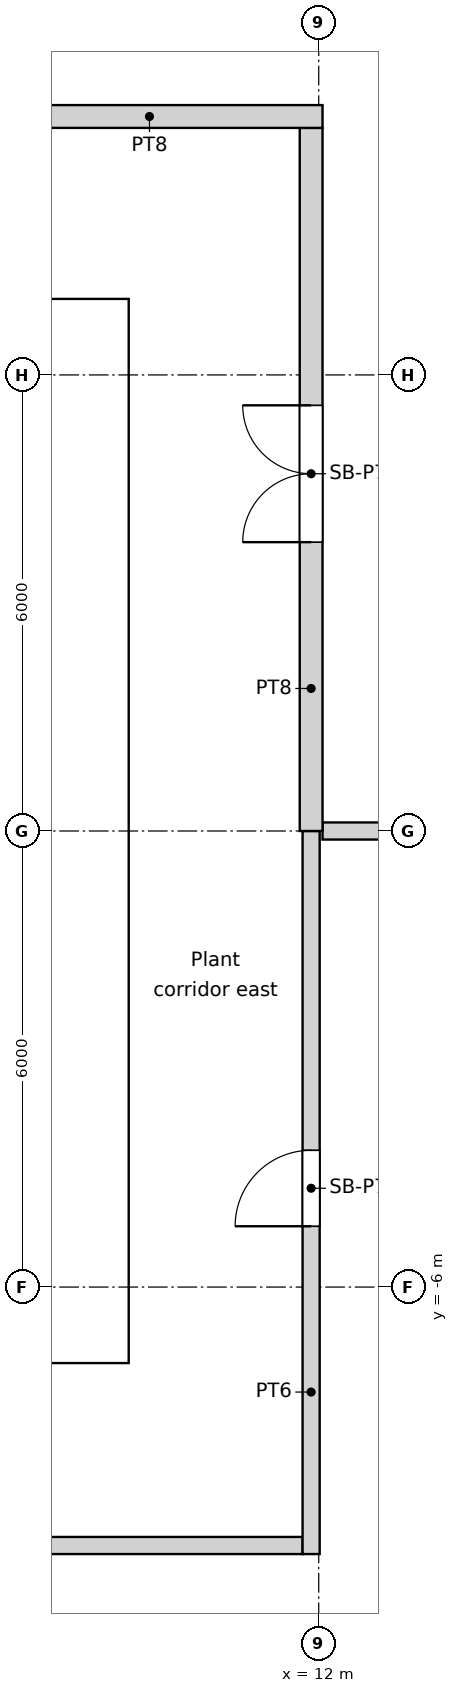
"""IFC4 building model, lengths in metres.
Left out: names, types, materials, properties, quantities, classifications, styles, units other than length and angle.
Written with IfcOpenShell. Run it as: python <this file> out.ifc"""

import sys

from ifc_helpers import new_model, si_unit, direction, frame, frame_2d, origin, place, context, subcontext, project, spatial, rectangle, extrude, element, fill, save


model = new_model("IFC4")
c1 = context("Model", 3, precision=1e-05, world=origin(), true_north=direction((0.0, 1.0)))
c2 = subcontext(c1, "Body", "Model", "MODEL_VIEW")
j1 = project(units=[si_unit("LENGTHUNIT", "METRE"), si_unit("PLANEANGLEUNIT", "RADIAN")], contexts=[c1])
p1 = place(None, origin())
s1 = spatial("IfcSite", under=j1, at=p1, CompositionType="ELEMENT")
p2 = place(p1, origin())
s2 = spatial("IfcBuilding", under=s1, at=p2, CompositionType="ELEMENT")
p3 = place(p2, frame((0.0, 0.0, 277.8)))
s3 = spatial("IfcBuildingStorey", under=s2, at=p3, CompositionType="ELEMENT", Elevation=277.8)
p4 = place(p3, frame((-9.5, -6.7, 0.0), z_axis=(0.0, 0.0, 1.0), x_axis=(1.0, 0.0, 0.0)))
e1 = element("IfcWall", 1, at=p4, inside=s3, PredefinedType="SOLIDWALL", context=c2, shape_type="SweptSolid", body=[
    extrude(rectangle(XDim=19.0, YDim=0.6, at=frame_2d((9.5, 0.0))), origin(), (0.0, 0.0, 1.0), 6.0),
])
p5 = place(p4, frame((10.4, 0.0, 0.0)))
e2 = element("IfcOpeningElement", 2, at=p5, cuts=e1, PredefinedType="OPENING", context=c2, shape_type="SweptSolid", body=[
    extrude(rectangle(XDim=1.0, YDim=2.1, at=frame_2d((0.5, 1.05))), frame((0.0, 0.3, 0.0), z_axis=(0.0, -1.0, 0.0), x_axis=(1.0, 0.0, 0.0)), (0.0, 0.0, 1.0), 0.6),
])
p6 = place(p4, frame((5.35, 0.0, 0.0)))
e3 = element("IfcOpeningElement", 3, at=p6, cuts=e1, PredefinedType="OPENING", context=c2, shape_type="SweptSolid", body=[
    extrude(rectangle(XDim=1.7, YDim=2.1, at=frame_2d((0.85, 1.05))), frame((0.0, 0.3, 0.0), z_axis=(0.0, -1.0, 0.0), x_axis=(1.0, 0.0, 0.0)), (0.0, 0.0, 1.0), 0.6),
])
p7 = place(p4, frame((11.95, 0.0, 0.0)))
e4 = element("IfcOpeningElement", 4, at=p7, cuts=e1, PredefinedType="OPENING", context=c2, shape_type="SweptSolid", body=[
    extrude(rectangle(XDim=1.7, YDim=2.1, at=frame_2d((0.85, 1.05))), frame((0.0, 0.3, 0.0), z_axis=(0.0, -1.0, 0.0), x_axis=(1.0, 0.0, 0.0)), (0.0, 0.0, 1.0), 0.6),
])
p8 = place(p3, frame((-9.5, 6.7, 0.0), z_axis=(0.0, 0.0, 1.0), x_axis=(1.0, 0.0, 0.0)))
e5 = element("IfcWall", 5, at=p8, inside=s3, PredefinedType="SOLIDWALL", context=c2, shape_type="SweptSolid", body=[
    extrude(rectangle(XDim=19.0, YDim=0.6, at=frame_2d((9.5, 0.0))), origin(), (0.0, 0.0, 1.0), 6.0),
])
p9 = place(p8, frame((5.35, 0.0, 0.0)))
e6 = element("IfcOpeningElement", 6, at=p9, cuts=e5, PredefinedType="OPENING", context=c2, shape_type="SweptSolid", body=[
    extrude(rectangle(XDim=1.7, YDim=2.1, at=frame_2d((0.85, 1.05))), frame((0.0, 0.3, 0.0), z_axis=(0.0, -1.0, 0.0), x_axis=(1.0, 0.0, 0.0)), (0.0, 0.0, 1.0), 0.6),
])
p10 = place(p3, frame((9.2, -6.4, 0.0), z_axis=(0.0, 0.0, 1.0), x_axis=(0.0, 1.0, 0.0)))
e7 = element("IfcWall", 7, at=p10, inside=s3, PredefinedType="SOLIDWALL", context=c2, shape_type="SweptSolid", body=[
    extrude(rectangle(XDim=12.8, YDim=0.6, at=frame_2d((6.4, 0.0))), origin(), (0.0, 0.0, 1.0), 6.0),
])
p11 = place(p10, frame((6.4, 0.0, 0.0)))
e8 = element("IfcOpeningElement", 8, at=p11, cuts=e7, PredefinedType="OPENING", context=c2, shape_type="SweptSolid", body=[
    extrude(rectangle(XDim=1.8, YDim=2.1, at=frame_2d((0.9, 1.05))), frame((0.0, 0.3, 0.0), z_axis=(0.0, -1.0, 0.0), x_axis=(1.0, 0.0, 0.0)), (0.0, 0.0, 1.0), 0.6),
])
p12 = place(p3, frame((2.1, -3.1, 0.0), z_axis=(0.0, 0.0, 1.0), x_axis=(1.0, 0.0, 0.0)))
e9 = element("IfcWall", 9, at=p12, inside=s3, PredefinedType="SOLIDWALL", context=c2, shape_type="SweptSolid", body=[
    extrude(rectangle(XDim=6.8, YDim=0.3, at=frame_2d((3.4, 0.0))), origin(), (0.0, 0.0, 1.0), 5.65),
])
p13 = place(p12, frame((0.35, 0.0, 0.0)))
e10 = element("IfcOpeningElement", 10, at=p13, cuts=e9, PredefinedType="OPENING", context=c2, shape_type="SweptSolid", body=[
    extrude(rectangle(XDim=1.7, YDim=2.1, at=frame_2d((0.85, 1.05))), frame((0.0, 0.15, 0.0), z_axis=(0.0, -1.0, 0.0), x_axis=(1.0, 0.0, 0.0)), (0.0, 0.0, 1.0), 0.3),
])
p14 = place(p3, frame((-4.35, 3.1, 0.0), z_axis=(0.0, 0.0, 1.0), x_axis=(1.0, 0.0, 0.0)))
e11 = element("IfcWall", 11, at=p14, inside=s3, PredefinedType="SOLIDWALL", context=c2, shape_type="SweptSolid", body=[
    extrude(rectangle(XDim=13.25, YDim=0.3, at=frame_2d((6.625, 0.0))), origin(), (0.0, 0.0, 1.0), 5.65),
])
p15 = place(p3, frame((4.225, -1.275, 0.0), z_axis=(0.0, 0.0, 1.0), x_axis=(1.0, 0.0, 0.0)))
e12 = element("IfcWall", 12, at=p15, inside=s3, PredefinedType="SOLIDWALL", context=c2, shape_type="SweptSolid", body=[
    extrude(rectangle(XDim=4.675, YDim=0.15, at=frame_2d((2.337, 0.0))), origin(), (0.0, 0.0, 1.0), 5.65),
])
p16 = place(p15, frame((0.55, 0.0, 0.0)))
e13 = element("IfcOpeningElement", 13, at=p16, cuts=e12, PredefinedType="OPENING", context=c2, shape_type="SweptSolid", body=[
    extrude(rectangle(XDim=0.9, YDim=2.1, at=frame_2d((0.45, 1.05))), frame((0.0, 0.075, 0.0), z_axis=(0.0, -1.0, 0.0), x_axis=(1.0, 0.0, 0.0)), (0.0, 0.0, 1.0), 0.15),
])
p17 = place(p15, frame((2.188, 0.0, 0.0)))
e14 = element("IfcOpeningElement", 14, at=p17, cuts=e12, PredefinedType="OPENING", context=c2, shape_type="SweptSolid", body=[
    extrude(rectangle(XDim=0.9, YDim=2.1, at=frame_2d((0.45, 1.05))), frame((0.0, 0.075, 0.0), z_axis=(0.0, -1.0, 0.0), x_axis=(1.0, 0.0, 0.0)), (0.0, 0.0, 1.0), 0.15),
])
p18 = place(p15, frame((3.6, 0.0, 0.0)))
e15 = element("IfcOpeningElement", 15, at=p18, cuts=e12, PredefinedType="OPENING", context=c2, shape_type="SweptSolid", body=[
    extrude(rectangle(XDim=0.9, YDim=2.1, at=frame_2d((0.45, 1.05))), frame((0.0, 0.075, 0.0), z_axis=(0.0, -1.0, 0.0), x_axis=(1.0, 0.0, 0.0)), (0.0, 0.0, 1.0), 0.15),
])
p19 = place(p3, frame((-11.788, -9.4, 0.0), z_axis=(0.0, 0.0, 1.0), x_axis=(1.0, 0.0, 0.0)))
e16 = element("IfcWall", 16, at=p19, inside=s3, PredefinedType="PARTITIONING", context=c2, shape_type="SweptSolid", body=[
    extrude(rectangle(XDim=23.575, YDim=0.225, at=frame_2d((11.788, 0.0))), origin(), (0.0, 0.0, 1.0), 5.65),
])
p20 = place(p19, frame((6.89, 0.0, 0.0)))
e17 = element("IfcOpeningElement", 17, at=p20, cuts=e16, PredefinedType="OPENING", context=c2, shape_type="SweptSolid", body=[
    extrude(rectangle(XDim=1.0, YDim=2.1, at=frame_2d((0.5, 1.05))), frame((0.0, 0.113, 0.0), z_axis=(0.0, -1.0, 0.0), x_axis=(1.0, 0.0, 0.0)), (0.0, 0.0, 1.0), 0.225),
])
p21 = place(p19, frame((15.388, 0.0, 0.0)))
e18 = element("IfcOpeningElement", 18, at=p21, cuts=e16, PredefinedType="OPENING", context=c2, shape_type="SweptSolid", body=[
    extrude(rectangle(XDim=1.0, YDim=2.1, at=frame_2d((0.5, 1.05))), frame((0.0, 0.113, 0.0), z_axis=(0.0, -1.0, 0.0), x_axis=(1.0, 0.0, 0.0)), (0.0, 0.0, 1.0), 0.225),
])
p22 = place(p3, frame((11.9, -9.512, 0.0), z_axis=(0.0, 0.0, 1.0), x_axis=(0.0, 1.0, 0.0)))
e19 = element("IfcWall", 19, at=p22, inside=s3, PredefinedType="PARTITIONING", context=c2, shape_type="SweptSolid", body=[
    extrude(rectangle(XDim=9.512, YDim=0.225, at=frame_2d((4.756, 0.0))), origin(), (0.0, 0.0, 1.0), 5.65),
])
p23 = place(p22, frame((4.312, 0.0, 0.0)))
e20 = element("IfcOpeningElement", 20, at=p23, cuts=e19, PredefinedType="OPENING", context=c2, shape_type="SweptSolid", body=[
    extrude(rectangle(XDim=1.0, YDim=2.1, at=frame_2d((0.5, 1.05))), frame((0.0, 0.113, 0.0), z_axis=(0.0, -1.0, 0.0), x_axis=(1.0, 0.0, 0.0)), (0.0, 0.0, 1.0), 0.225),
])
p24 = place(p3, frame((11.9, 0.0, 0.0), z_axis=(0.0, 0.0, 1.0), x_axis=(0.0, 1.0, 0.0)))
e21 = element("IfcWall", 21, at=p24, inside=s3, PredefinedType="PARTITIONING", context=c2, shape_type="SweptSolid", body=[
    extrude(rectangle(XDim=9.25, YDim=0.3, at=frame_2d((4.625, 0.0))), origin(), (0.0, 0.0, 1.0), 5.65),
])
p25 = place(p24, frame((3.8, 0.0, 0.0)))
e22 = element("IfcOpeningElement", 22, at=p25, cuts=e21, PredefinedType="OPENING", context=c2, shape_type="SweptSolid", body=[
    extrude(rectangle(XDim=1.8, YDim=2.4, at=frame_2d((0.9, 1.2))), frame((0.0, 0.15, 0.0), z_axis=(0.0, -1.0, 0.0), x_axis=(1.0, 0.0, 0.0)), (0.0, 0.0, 1.0), 0.3),
])
p26 = place(p3, frame((12.05, 9.4, 0.0), z_axis=(0.0, 0.0, 1.0), x_axis=(-1.0, 0.0, 0.0)))
e23 = element("IfcWall", 23, at=p26, inside=s3, PredefinedType="PARTITIONING", context=c2, shape_type="SweptSolid", body=[
    extrude(rectangle(XDim=4.554, YDim=0.3, at=frame_2d((2.277, 0.0))), origin(), (0.0, 0.0, 1.0), 5.65),
])
p27 = place(p3, frame((12.327, -15.458, 0.0), z_axis=(0.0, 0.0, 1.0), x_axis=(-0.623469403717, 0.781847749008, 0.0)))
e24 = element("IfcWall", 24, at=p27, inside=s3, PredefinedType="PARTITIONING", context=c2, shape_type="SweptSolid", body=[
    extrude(rectangle(XDim=7.56, YDim=0.225, at=frame_2d((3.78, 0.0))), origin(), (0.0, 0.0, 1.0), 2.7),
])
p28 = place(p3, frame((12.327, 15.458, 0.0), z_axis=(0.0, 0.0, 1.0), x_axis=(-0.623488645806, -0.781832404388, 0.0)))
e25 = element("IfcWall", 25, at=p28, inside=s3, PredefinedType="PARTITIONING", context=c2, shape_type="SweptSolid", body=[
    extrude(rectangle(XDim=7.557, YDim=0.225, at=frame_2d((3.778, 0.0))), origin(), (0.0, 0.0, 1.0), 2.7),
])
p29 = place(p3, frame((19.771, 0.0, 0.0), z_axis=(0.0, 0.0, 1.0), x_axis=(-1.0, 0.0, 0.0)))
e26 = element("IfcWall", 26, at=p29, inside=s3, PredefinedType="PARTITIONING", context=c2, shape_type="SweptSolid", body=[
    extrude(rectangle(XDim=7.721, YDim=0.225, at=frame_2d((3.861, 0.0))), origin(), (0.0, 0.0, 1.0), 2.7),
])
p30 = place(p11, origin())
e27 = element("IfcDoor", 27, at=p30, inside=s3, OperationType="DOUBLE_DOOR_SINGLE_SWING", PredefinedType="DOOR", context=c2, shape_type="SweptSolid", body=[
    extrude(rectangle(XDim=1.8, YDim=2.1, at=frame_2d((0.9, 1.05))), frame((0.0, 0.025, 0.0), z_axis=(0.0, -1.0, 0.0), x_axis=(1.0, 0.0, 0.0)), (0.0, 0.0, 1.0), 0.05),
])
fill(e8, e27)
p31 = place(p18, origin())
e28 = element("IfcDoor", 28, at=p31, inside=s3, OperationType="SINGLE_SWING_RIGHT", PredefinedType="DOOR", context=c2, shape_type="SweptSolid", body=[
    extrude(rectangle(XDim=0.9, YDim=2.1, at=frame_2d((0.45, 1.05))), frame((0.0, 0.025, 0.0), z_axis=(0.0, -1.0, 0.0), x_axis=(1.0, 0.0, 0.0)), (0.0, 0.0, 1.0), 0.05),
])
fill(e15, e28)
p32 = place(p25, origin())
e29 = element("IfcDoor", 29, at=p32, inside=s3, OperationType="DOUBLE_DOOR_SINGLE_SWING", PredefinedType="DOOR", context=c2, shape_type="SweptSolid", body=[
    extrude(rectangle(XDim=1.8, YDim=2.4, at=frame_2d((0.9, 1.2))), frame((0.0, 0.025, 0.0), z_axis=(0.0, -1.0, 0.0), x_axis=(1.0, 0.0, 0.0)), (0.0, 0.0, 1.0), 0.05),
])
fill(e22, e29)
p33 = place(p23, origin())
e30 = element("IfcDoor", 30, at=p33, inside=s3, OperationType="SINGLE_SWING_LEFT", PredefinedType="DOOR", context=c2, shape_type="SweptSolid", body=[
    extrude(rectangle(XDim=1.0, YDim=2.1, at=frame_2d((0.5, 1.05))), frame((0.0, 0.025, 0.0), z_axis=(0.0, -1.0, 0.0), x_axis=(1.0, 0.0, 0.0)), (0.0, 0.0, 1.0), 0.05),
])
fill(e20, e30)
save(model, sys.argv[1])
